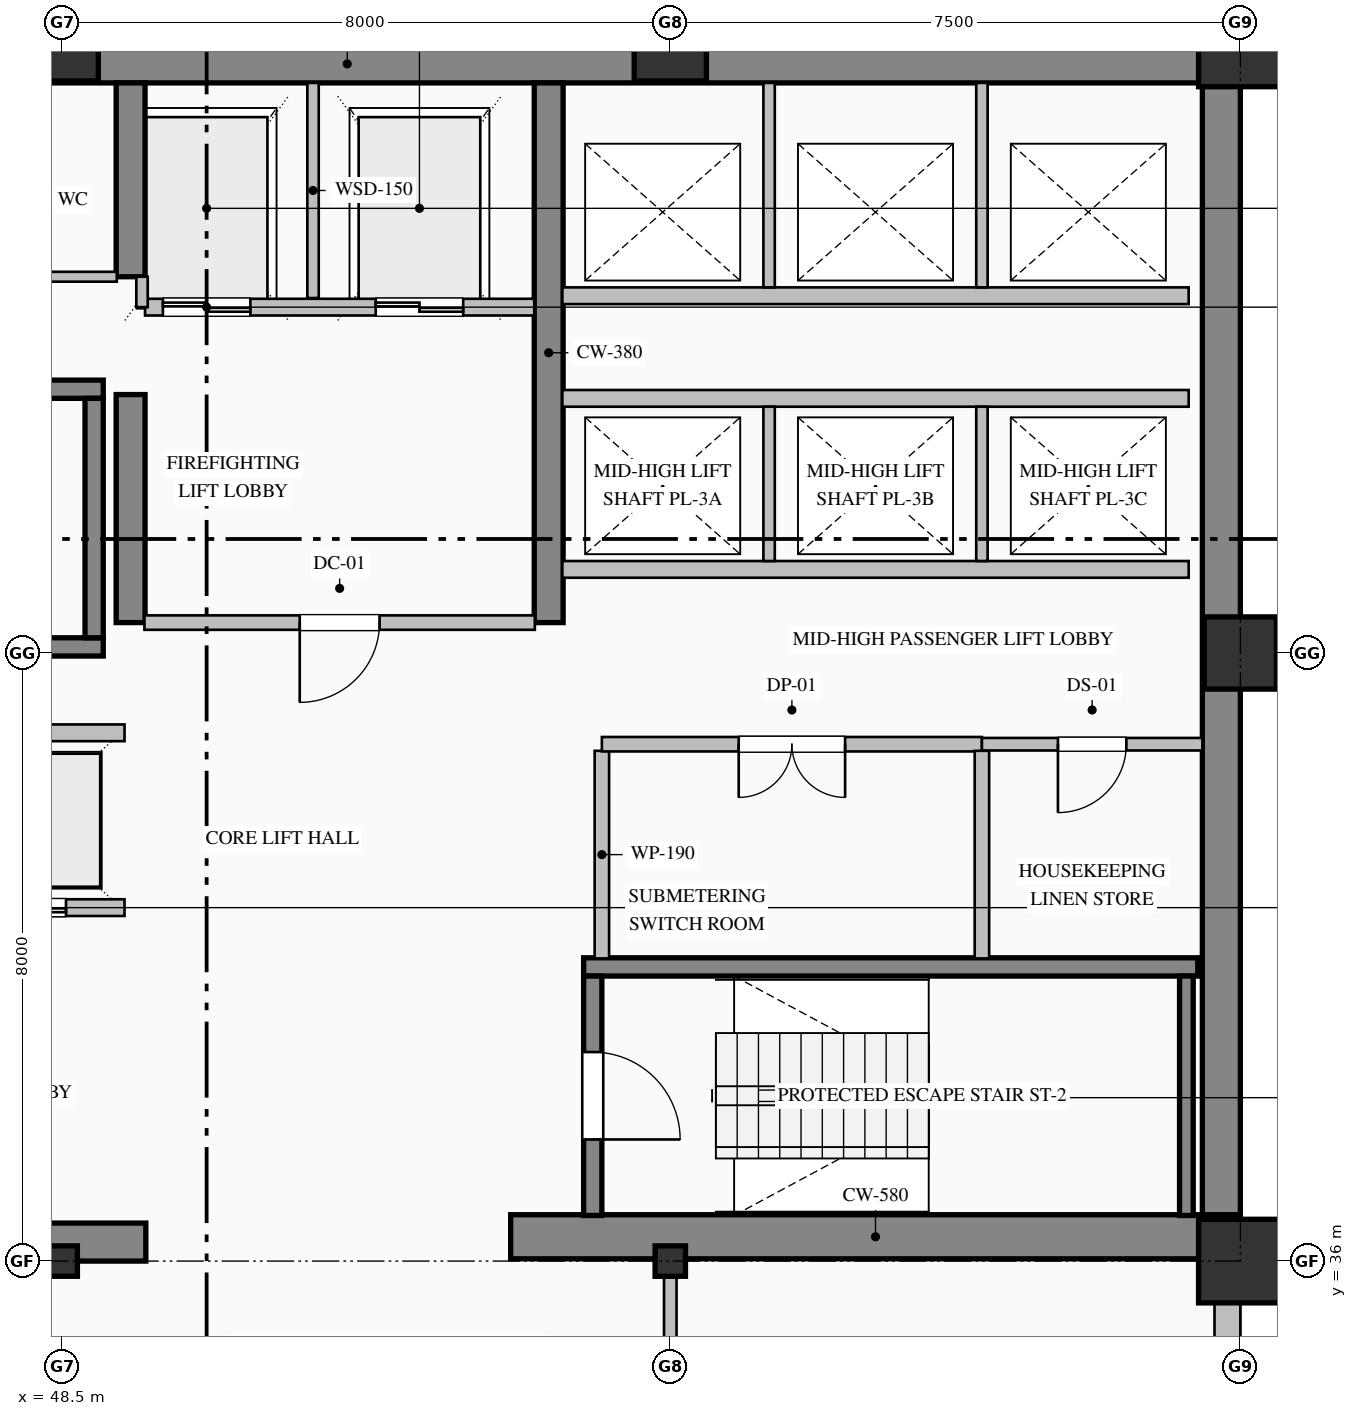
"""IFC4 building model, lengths in metres.
Left out: names, types, materials, properties, quantities, classifications, styles, units other than length and angle.
Written with IfcOpenShell. Run it as: python <this file> out.ifc"""

import sys

from ifc_helpers import new_model, si_unit, direction, frame, frame_2d, origin, origin_2d, place, context, subcontext, project, spatial, rectangle, hollow_rectangle, i_section, extrude, element, fill, save


model = new_model("IFC4")
c1 = context("Model", 3, precision=1e-05, world=origin(), true_north=direction((0.0, 1.0)))
c2 = subcontext(c1, "Body", "Model", "MODEL_VIEW")
j1 = project(units=[si_unit("LENGTHUNIT", "METRE"), si_unit("PLANEANGLEUNIT", "RADIAN")], contexts=[c1])
p1 = place(None, origin())
s1 = spatial("IfcSite", under=j1, at=p1, CompositionType="ELEMENT")
p2 = place(p1, origin())
s2 = spatial("IfcBuilding", under=s1, at=p2, CompositionType="ELEMENT")
p3 = place(p2, frame((0.0, 0.0, 131.0)))
s3 = spatial("IfcBuildingStorey", under=s2, at=p3, CompositionType="ELEMENT", Elevation=131.0)
p4 = place(p3, frame((40.5, 51.75, 0.0), z_axis=(0.0, 0.0, 1.0), x_axis=(1.0, 0.0, 0.0)))
e1 = element("IfcWall", 1, at=p4, inside=s3, PredefinedType="SHEAR", context=c2, shape_type="SweptSolid", body=[
    extrude(rectangle(XDim=23.5, YDim=0.5, at=frame_2d((11.75, 0.0))), origin(), (0.0, 0.0, 1.0), 3.765),
])
p5 = place(p3, frame((63.75, 36.32, 0.0), z_axis=(0.0, 0.0, 1.0), x_axis=(0.0, 1.0, 0.0)))
e2 = element("IfcWall", 2, at=p5, inside=s3, PredefinedType="SHEAR", context=c2, shape_type="SweptSolid", body=[
    extrude(rectangle(XDim=15.18, YDim=0.5, at=frame_2d((7.59, 0.0))), origin(), (0.0, 0.0, 1.0), 3.765),
])
p6 = place(p3, frame((40.5, 36.25, 0.0), z_axis=(0.0, 0.0, 1.0), x_axis=(1.0, 0.0, 0.0)))
e3 = element("IfcWall", 3, at=p6, inside=s3, PredefinedType="SHEAR", context=c2, shape_type="SweptSolid", body=[
    extrude(rectangle(XDim=9.1, YDim=0.5, at=frame_2d((4.55, 0.0))), origin(), (0.0, 0.0, 1.0), 3.765),
])
p7 = place(p3, frame((54.4, 36.32, 0.0), z_axis=(0.0, 0.0, 1.0), x_axis=(1.0, 0.0, 0.0)))
e4 = element("IfcWall", 4, at=p7, inside=s3, PredefinedType="SHEAR", context=c2, shape_type="SweptSolid", body=[
    extrude(rectangle(XDim=9.6, YDim=0.58, at=frame_2d((4.8, 0.0))), origin(), (0.0, 0.0, 1.0), 4.0),
])
p8 = place(p3, frame((49.4, 44.4, 0.0), z_axis=(0.0, 0.0, 1.0), x_axis=(0.0, 1.0, 0.0)))
e5 = element("IfcWall", 5, at=p8, inside=s3, PredefinedType="SHEAR", context=c2, shape_type="SweptSolid", body=[
    extrude(rectangle(XDim=3.0, YDim=0.38, at=frame_2d((1.5, 0.0))), origin(), (0.0, 0.0, 1.0), 3.765),
])
p9 = place(p3, frame((49.4, 48.95, 0.0), z_axis=(0.0, 0.0, 1.0), x_axis=(0.0, 1.0, 0.0)))
e6 = element("IfcWall", 6, at=p9, inside=s3, PredefinedType="SHEAR", context=c2, shape_type="SweptSolid", body=[
    extrude(rectangle(XDim=2.55, YDim=0.38, at=frame_2d((1.275, 0.0))), origin(), (0.0, 0.0, 1.0), 3.765),
])
p10 = place(p3, frame((54.9, 44.4, 0.0), z_axis=(0.0, 0.0, 1.0), x_axis=(0.0, 1.0, 0.0)))
e7 = element("IfcWall", 7, at=p10, inside=s3, PredefinedType="SHEAR", context=c2, shape_type="SweptSolid", body=[
    extrude(rectangle(XDim=7.1, YDim=0.38, at=frame_2d((3.55, 0.0))), origin(), (0.0, 0.0, 1.0), 3.765),
])
p11 = place(p3, frame((48.5, 36.0, 0.0), z_axis=(0.0, 0.0, 1.0), x_axis=(1.0, 0.0, 0.0)))
e8 = element("IfcColumn", 8, at=p11, inside=s3, PredefinedType="COLUMN", context=c2, shape_type="SweptSolid", body=[
    extrude(i_section(OverallWidth=0.4, OverallDepth=0.4, WebThickness=0.013, FlangeThickness=0.021, FilletRadius=0.022, at=origin_2d()), origin(), (0.0, 0.0, 1.0), 4.0),
])
p12 = place(p3, frame((48.5, 52.0, 0.0), z_axis=(0.0, 0.0, 1.0), x_axis=(1.0, 0.0, 0.0)))
e9 = element("IfcColumn", 9, at=p12, inside=s3, PredefinedType="COLUMN", context=c2, shape_type="SweptSolid", body=[
    extrude(hollow_rectangle(XDim=0.95, YDim=0.95, WallThickness=0.036, at=origin_2d()), origin(), (0.0, 0.0, 1.0), 4.0),
])
p13 = place(p3, frame((56.5, 36.0, 0.0), z_axis=(0.0, 0.0, 1.0), x_axis=(1.0, 0.0, 0.0)))
e10 = element("IfcColumn", 10, at=p13, inside=s3, PredefinedType="COLUMN", context=c2, shape_type="SweptSolid", body=[
    extrude(i_section(OverallWidth=0.4, OverallDepth=0.4, WebThickness=0.013, FlangeThickness=0.021, FilletRadius=0.022, at=origin_2d()), origin(), (0.0, 0.0, 1.0), 4.0),
])
p14 = place(p3, frame((56.5, 52.0, 0.0), z_axis=(0.0, 0.0, 1.0), x_axis=(1.0, 0.0, 0.0)))
e11 = element("IfcColumn", 11, at=p14, inside=s3, PredefinedType="COLUMN", context=c2, shape_type="SweptSolid", body=[
    extrude(hollow_rectangle(XDim=0.95, YDim=0.95, WallThickness=0.036, at=origin_2d()), origin(), (0.0, 0.0, 1.0), 4.0),
])
p15 = place(p3, frame((64.0, 36.0, 0.0), z_axis=(0.0, 0.0, 1.0), x_axis=(1.0, 0.0, 0.0)))
e12 = element("IfcColumn", 12, at=p15, inside=s3, PredefinedType="COLUMN", context=c2, shape_type="SweptSolid", body=[
    extrude(hollow_rectangle(XDim=1.1, YDim=1.1, WallThickness=0.04, at=origin_2d()), origin(), (0.0, 0.0, 1.0), 4.0),
])
p16 = place(p3, frame((64.0, 44.0, 0.0), z_axis=(0.0, 0.0, 1.0), x_axis=(1.0, 0.0, 0.0)))
e13 = element("IfcColumn", 13, at=p16, inside=s3, PredefinedType="COLUMN", context=c2, shape_type="SweptSolid", body=[
    extrude(hollow_rectangle(XDim=0.95, YDim=0.95, WallThickness=0.036, at=origin_2d()), origin(), (0.0, 0.0, 1.0), 4.0),
])
p17 = place(p3, frame((64.0, 52.0, 0.0), z_axis=(0.0, 0.0, 1.0), x_axis=(1.0, 0.0, 0.0)))
e14 = element("IfcColumn", 14, at=p17, inside=s3, PredefinedType="COLUMN", context=c2, shape_type="SweptSolid", body=[
    extrude(hollow_rectangle(XDim=1.1, YDim=1.1, WallThickness=0.04, at=origin_2d()), origin(), (0.0, 0.0, 1.0), 4.0),
])
p18 = place(p3, frame((63.83, 36.05, 0.0), z_axis=(0.0, 0.0, 1.0), x_axis=(0.0, -1.0, 0.0)))
e15 = element("IfcWall", 15, at=p18, inside=s3, PredefinedType="SOLIDWALL", context=c2, shape_type="SweptSolid", body=[
    extrude(rectangle(XDim=28.05, YDim=0.34, at=frame_2d((14.025, 0.0))), origin(), (0.0, 0.0, 1.0), 3.265),
])
p19 = place(p18, frame((2.775, 0.0, 0.85)))
e16 = element("IfcOpeningElement", 16, at=p19, cuts=e15, PredefinedType="OPENING", context=c2, shape_type="SweptSolid", body=[
    extrude(rectangle(XDim=1.65, YDim=1.95, at=frame_2d((0.825, 0.975))), frame((0.0, 0.18, 0.0), z_axis=(0.0, -1.0, 0.0), x_axis=(1.0, 0.0, 0.0)), (0.0, 0.0, 1.0), 0.36),
])
p20 = place(p18, frame((10.05, 0.0, 0.85)))
e17 = element("IfcOpeningElement", 17, at=p20, cuts=e15, PredefinedType="OPENING", context=c2, shape_type="SweptSolid", body=[
    extrude(rectangle(XDim=1.5, YDim=1.95, at=frame_2d((0.75, 0.975))), frame((0.0, 0.18, 0.0), z_axis=(0.0, -1.0, 0.0), x_axis=(1.0, 0.0, 0.0)), (0.0, 0.0, 1.0), 0.36),
])
p21 = place(p18, frame((13.575, 0.0, 0.85)))
e18 = element("IfcOpeningElement", 18, at=p21, cuts=e15, PredefinedType="OPENING", context=c2, shape_type="SweptSolid", body=[
    extrude(rectangle(XDim=1.65, YDim=1.95, at=frame_2d((0.825, 0.975))), frame((0.0, 0.18, 0.0), z_axis=(0.0, -1.0, 0.0), x_axis=(1.0, 0.0, 0.0)), (0.0, 0.0, 1.0), 0.36),
])
for number, where, z_axis, x_axis in (
    (19, (40.96, 47.47, 0.0), (0.0, 0.0, 1.0), (1.0, 0.0, 0.0)),
    (20, (49.04, 44.08, 0.0), (0.0, 0.0, 1.0), (-1.0, 0.0, 0.0)),
):
    element("IfcWall", number, at=place(p3, frame(where, z_axis=z_axis, x_axis=x_axis)), inside=s3, PredefinedType="SOLIDWALL", context=c2, shape_type="SweptSolid", body=[
        extrude(rectangle(XDim=8.08, YDim=0.24, at=frame_2d((4.04, 0.0))), origin(), (0.0, 0.0, 1.0), 4.0),
    ])
p22 = place(p3, frame((48.92, 44.2, 0.0), z_axis=(0.0, 0.0, 1.0), x_axis=(0.0, 1.0, 0.0)))
e21 = element("IfcWall", 21, at=p22, inside=s3, PredefinedType="SOLIDWALL", context=c2, shape_type="SweptSolid", body=[
    extrude(rectangle(XDim=3.15, YDim=0.24, at=frame_2d((1.575, 0.0))), origin(), (0.0, 0.0, 1.0), 4.0),
])
p23 = place(p3, frame((55.36, 39.87, 0.0), z_axis=(0.0, 0.0, 1.0), x_axis=(1.0, 0.0, 0.0)))
e22 = element("IfcWall", 22, at=p23, inside=s3, PredefinedType="SOLIDWALL", context=c2, shape_type="SweptSolid", body=[
    extrude(rectangle(XDim=8.08, YDim=0.24, at=frame_2d((4.04, 0.0))), origin(), (0.0, 0.0, 1.0), 4.0),
])
p24 = place(p3, frame((55.48, 39.75, 0.0), z_axis=(0.0, 0.0, 1.0), x_axis=(0.0, -1.0, 0.0)))
e23 = element("IfcWall", 23, at=p24, inside=s3, PredefinedType="SOLIDWALL", context=c2, shape_type="SweptSolid", body=[
    extrude(rectangle(XDim=3.15, YDim=0.24, at=frame_2d((1.575, 0.0))), origin(), (0.0, 0.0, 1.0), 4.0),
])
p25 = place(p24, frame((1.0, 0.0, 0.0)))
e24 = element("IfcOpeningElement", 24, at=p25, cuts=e23, PredefinedType="OPENING", context=c2, shape_type="SweptSolid", body=[
    extrude(rectangle(XDim=1.15, YDim=2.2, at=frame_2d((0.575, 1.1))), frame((0.0, 0.13, 0.0), z_axis=(0.0, -1.0, 0.0), x_axis=(1.0, 0.0, 0.0)), (0.0, 0.0, 1.0), 0.26),
])
p26 = place(p3, frame((63.29, 36.6, 0.0), z_axis=(0.0, 0.0, 1.0), x_axis=(0.0, 1.0, 0.0)))
e25 = element("IfcWall", 25, at=p26, inside=s3, PredefinedType="SOLIDWALL", context=c2, shape_type="SweptSolid", body=[
    extrude(rectangle(XDim=3.15, YDim=0.18, at=frame_2d((1.575, 0.0))), origin(), (0.0, 0.0, 1.0), 4.0),
])
p27 = place(p3, frame((54.71, 48.55, 0.0), z_axis=(0.0, 0.0, 1.0), x_axis=(-1.0, 0.0, 0.0)))
e26 = element("IfcWall", 26, at=p27, inside=s3, PredefinedType="PARTITIONING", context=c2, shape_type="SweptSolid", body=[
    extrude(rectangle(XDim=5.12, YDim=0.22, at=frame_2d((2.56, 0.0))), origin(), (0.0, 0.0, 1.0), 3.765),
])
p28 = place(p27, frame((3.735, 0.0, 0.0)))
e27 = element("IfcOpeningElement", 27, at=p28, cuts=e26, PredefinedType="OPENING", context=c2, shape_type="SweptSolid", body=[
    extrude(rectangle(XDim=1.15, YDim=2.2, at=frame_2d((0.575, 1.1))), frame((0.0, 0.12, 0.0), z_axis=(0.0, -1.0, 0.0), x_axis=(1.0, 0.0, 0.0)), (0.0, 0.0, 1.0), 0.24),
])
p29 = place(p27, frame((0.935, 0.0, 0.0)))
e28 = element("IfcOpeningElement", 28, at=p29, cuts=e26, PredefinedType="OPENING", context=c2, shape_type="SweptSolid", body=[
    extrude(rectangle(XDim=1.15, YDim=2.2, at=frame_2d((0.575, 1.1))), frame((0.0, 0.12, 0.0), z_axis=(0.0, -1.0, 0.0), x_axis=(1.0, 0.0, 0.0)), (0.0, 0.0, 1.0), 0.24),
])
p30 = place(p3, frame((51.8, 48.67, 0.0), z_axis=(0.0, 0.0, 1.0), x_axis=(0.0, 1.0, 0.0)))
e29 = element("IfcWall", 29, at=p30, inside=s3, PredefinedType="PARTITIONING", context=c2, shape_type="SweptSolid", body=[
    extrude(rectangle(XDim=2.83, YDim=0.15, at=frame_2d((1.415, 0.0))), origin(), (0.0, 0.0, 1.0), 3.765),
])
p31 = place(p3, frame((49.55, 48.55, 0.0), z_axis=(0.0, 0.0, 1.0), x_axis=(0.0, 1.0, 0.0)))
e30 = element("IfcWall", 30, at=p31, inside=s3, PredefinedType="PARTITIONING", context=c2, shape_type="SweptSolid", body=[
    extrude(rectangle(XDim=0.4, YDim=0.15, at=frame_2d((0.2, 0.0))), origin(), (0.0, 0.0, 1.0), 3.765),
])
p32 = place(p3, frame((49.32, 40.65, 0.0), z_axis=(0.0, 0.0, 1.0), x_axis=(-1.0, 0.0, 0.0)))
e31 = element("IfcWall", 31, at=p32, inside=s3, PredefinedType="PARTITIONING", context=c2, shape_type="SweptSolid", body=[
    extrude(rectangle(XDim=8.24, YDim=0.22, at=frame_2d((4.12, 0.0))), origin(), (0.0, 0.0, 1.0), 3.765),
])
p33 = place(p32, frame((6.37, 0.0, 0.0)))
e32 = element("IfcOpeningElement", 32, at=p33, cuts=e31, PredefinedType="OPENING", context=c2, shape_type="SweptSolid", body=[
    extrude(rectangle(XDim=1.1, YDim=2.2, at=frame_2d((0.55, 1.1))), frame((0.0, 0.12, 0.0), z_axis=(0.0, -1.0, 0.0), x_axis=(1.0, 0.0, 0.0)), (0.0, 0.0, 1.0), 0.24),
])
p34 = place(p32, frame((3.57, 0.0, 0.0)))
e33 = element("IfcOpeningElement", 33, at=p34, cuts=e31, PredefinedType="OPENING", context=c2, shape_type="SweptSolid", body=[
    extrude(rectangle(XDim=1.1, YDim=2.2, at=frame_2d((0.55, 1.1))), frame((0.0, 0.12, 0.0), z_axis=(0.0, -1.0, 0.0), x_axis=(1.0, 0.0, 0.0)), (0.0, 0.0, 1.0), 0.24),
])
p35 = place(p32, frame((0.77, 0.0, 0.0)))
e34 = element("IfcOpeningElement", 34, at=p35, cuts=e31, PredefinedType="OPENING", context=c2, shape_type="SweptSolid", body=[
    extrude(rectangle(XDim=1.1, YDim=2.2, at=frame_2d((0.55, 1.1))), frame((0.0, 0.12, 0.0), z_axis=(0.0, -1.0, 0.0), x_axis=(1.0, 0.0, 0.0)), (0.0, 0.0, 1.0), 0.24),
])
for number, where, z_axis, x_axis in (
    (35, (41.08, 42.95, 0.0), (0.0, 0.0, 1.0), (1.0, 0.0, 0.0)),
    (36, (63.32, 45.1, 0.0), (0.0, 0.0, 1.0), (-1.0, 0.0, 0.0)),
    (37, (55.08, 47.35, 0.0), (0.0, 0.0, 1.0), (1.0, 0.0, 0.0)),
):
    element("IfcWall", number, at=place(p3, frame(where, z_axis=z_axis, x_axis=x_axis)), inside=s3, PredefinedType="PARTITIONING", context=c2, shape_type="SweptSolid", body=[
        extrude(rectangle(XDim=8.24, YDim=0.22, at=frame_2d((4.12, 0.0))), origin(), (0.0, 0.0, 1.0), 3.765),
    ])
for number, where, z_axis, x_axis in (
    (38, (57.8, 45.21, 0.0), (0.0, 0.0, 1.0), (0.0, 1.0, 0.0)),
    (39, (60.6, 45.21, 0.0), (0.0, 0.0, 1.0), (0.0, 1.0, 0.0)),
):
    element("IfcWall", number, at=place(p3, frame(where, z_axis=z_axis, x_axis=x_axis)), inside=s3, PredefinedType="PARTITIONING", context=c2, shape_type="SweptSolid", body=[
        extrude(rectangle(XDim=2.03, YDim=0.15, at=frame_2d((1.015, 0.0))), origin(), (0.0, 0.0, 1.0), 3.765),
    ])
p36 = place(p3, frame((63.32, 48.7, 0.0), z_axis=(0.0, 0.0, 1.0), x_axis=(-1.0, 0.0, 0.0)))
e40 = element("IfcWall", 40, at=p36, inside=s3, PredefinedType="PARTITIONING", context=c2, shape_type="SweptSolid", body=[
    extrude(rectangle(XDim=8.24, YDim=0.22, at=frame_2d((4.12, 0.0))), origin(), (0.0, 0.0, 1.0), 3.765),
])
for number, where, z_axis, x_axis in (
    (41, (57.8, 48.81, 0.0), (0.0, 0.0, 1.0), (0.0, 1.0, 0.0)),
    (42, (60.6, 48.81, 0.0), (0.0, 0.0, 1.0), (0.0, 1.0, 0.0)),
):
    element("IfcWall", number, at=place(p3, frame(where, z_axis=z_axis, x_axis=x_axis)), inside=s3, PredefinedType="PARTITIONING", context=c2, shape_type="SweptSolid", body=[
        extrude(rectangle(XDim=2.69, YDim=0.15, at=frame_2d((1.345, 0.0))), origin(), (0.0, 0.0, 1.0), 3.765),
    ])
p37 = place(p3, frame((43.5, 48.95, 0.0), z_axis=(0.0, 0.0, 1.0), x_axis=(1.0, 0.0, 0.0)))
e43 = element("IfcWall", 43, at=p37, inside=s3, PredefinedType="PARTITIONING", context=c2, shape_type="SweptSolid", body=[
    extrude(rectangle(XDim=5.718, YDim=0.13, at=frame_2d((2.859, 0.0))), origin(), (0.0, 0.0, 1.0), 3.765),
])
p38 = place(p37, frame((2.399, 0.0, 0.0)))
e44 = element("IfcOpeningElement", 44, at=p38, cuts=e43, PredefinedType="OPENING", context=c2, shape_type="SweptSolid", body=[
    extrude(rectangle(XDim=0.92, YDim=2.15, at=frame_2d((0.46, 1.075))), frame((0.0, 0.075, 0.0), z_axis=(0.0, -1.0, 0.0), x_axis=(1.0, 0.0, 0.0)), (0.0, 0.0, 1.0), 0.15),
])
p39 = place(p3, frame((54.718, 44.4, 0.0), z_axis=(0.0, 0.0, 1.0), x_axis=(-1.0, 0.0, 0.0)))
e45 = element("IfcWall", 45, at=p39, inside=s3, PredefinedType="PARTITIONING", context=c2, shape_type="SweptSolid", body=[
    extrude(rectangle(XDim=5.136, YDim=0.19, at=frame_2d((2.568, 0.0))), origin(), (0.0, 0.0, 1.0), 3.765),
])
p40 = place(p39, frame((2.043, 0.0, 0.0)))
e46 = element("IfcOpeningElement", 46, at=p40, cuts=e45, PredefinedType="OPENING", context=c2, shape_type="SweptSolid", body=[
    extrude(rectangle(XDim=1.05, YDim=2.15, at=frame_2d((0.525, 1.075))), frame((0.0, 0.105, 0.0), z_axis=(0.0, -1.0, 0.0), x_axis=(1.0, 0.0, 0.0)), (0.0, 0.0, 1.0), 0.21),
])
p41 = place(p3, frame((55.6, 42.713, 0.0), z_axis=(0.0, 0.0, 1.0), x_axis=(0.0, -1.0, 0.0)))
e47 = element("IfcWall", 47, at=p41, inside=s3, PredefinedType="PARTITIONING", context=c2, shape_type="SweptSolid", body=[
    extrude(rectangle(XDim=2.731, YDim=0.19, at=frame_2d((1.365, 0.0))), origin(), (0.0, 0.0, 1.0), 3.765),
])
p42 = place(p3, frame((60.6, 42.8, 0.0), z_axis=(0.0, 0.0, 1.0), x_axis=(-1.0, 0.0, 0.0)))
e48 = element("IfcWall", 48, at=p42, inside=s3, PredefinedType="PARTITIONING", context=c2, shape_type="SweptSolid", body=[
    extrude(rectangle(XDim=5.0, YDim=0.19, at=frame_2d((2.5, 0.0))), origin(), (0.0, 0.0, 1.0), 3.765),
])
p43 = place(p42, frame((1.8, 0.0, 0.0)))
e49 = element("IfcOpeningElement", 49, at=p43, cuts=e48, PredefinedType="OPENING", context=c2, shape_type="SweptSolid", body=[
    extrude(rectangle(XDim=1.4, YDim=2.25, at=frame_2d((0.7, 1.125))), frame((0.0, 0.105, 0.0), z_axis=(0.0, -1.0, 0.0), x_axis=(1.0, 0.0, 0.0)), (0.0, 0.0, 1.0), 0.21),
])
p44 = place(p3, frame((63.5, 42.8, 0.0), z_axis=(0.0, 0.0, 1.0), x_axis=(-1.0, 0.0, 0.0)))
e50 = element("IfcWall", 50, at=p44, inside=s3, PredefinedType="PARTITIONING", context=c2, shape_type="SweptSolid", body=[
    extrude(rectangle(XDim=2.9, YDim=0.165, at=frame_2d((1.45, 0.0))), origin(), (0.0, 0.0, 1.0), 3.765),
])
p45 = place(p44, frame((1.0, 0.0, 0.0)))
e51 = element("IfcOpeningElement", 51, at=p45, cuts=e50, PredefinedType="OPENING", context=c2, shape_type="SweptSolid", body=[
    extrude(rectangle(XDim=0.9, YDim=2.15, at=frame_2d((0.45, 1.075))), frame((0.0, 0.093, 0.0), z_axis=(0.0, -1.0, 0.0), x_axis=(1.0, 0.0, 0.0)), (0.0, 0.0, 1.0), 0.185),
])
p46 = place(p3, frame((60.6, 42.713, 0.0), z_axis=(0.0, 0.0, 1.0), x_axis=(0.0, -1.0, 0.0)))
e52 = element("IfcWall", 52, at=p46, inside=s3, PredefinedType="PARTITIONING", context=c2, shape_type="SweptSolid", body=[
    extrude(rectangle(XDim=2.731, YDim=0.19, at=frame_2d((1.365, 0.0))), origin(), (0.0, 0.0, 1.0), 3.765),
])
p47 = place(p3, frame((56.5, 36.0, 0.0), z_axis=(0.0, 0.0, 1.0), x_axis=(0.0, -1.0, 0.0)))
e53 = element("IfcWall", 53, at=p47, inside=s3, PredefinedType="PARTITIONING", context=c2, shape_type="SweptSolid", body=[
    extrude(rectangle(XDim=2.325, YDim=0.165, at=frame_2d((1.163, 0.0))), origin(), (0.0, 0.0, 1.0), 3.157),
])
p48 = place(p25, origin())
e54 = element("IfcDoor", 54, at=p48, inside=s3, OperationType="SINGLE_SWING_RIGHT", PredefinedType="DOOR", context=c2, shape_type="SweptSolid", body=[
    extrude(rectangle(XDim=1.15, YDim=2.2, at=frame_2d((0.575, 1.1))), frame((0.0, 0.025, 0.0), z_axis=(0.0, -1.0, 0.0), x_axis=(1.0, 0.0, 0.0)), (0.0, 0.0, 1.0), 0.05),
])
fill(e24, e54)
p49 = place(p28, origin())
e55 = element("IfcDoor", 55, at=p49, inside=s3, OperationType="DOUBLE_DOOR_SLIDING", PredefinedType="DOOR", context=c2, shape_type="SweptSolid", body=[
    extrude(rectangle(XDim=1.15, YDim=2.2, at=frame_2d((0.575, 1.1))), frame((0.0, 0.025, 0.0), z_axis=(0.0, -1.0, 0.0), x_axis=(1.0, 0.0, 0.0)), (0.0, 0.0, 1.0), 0.05),
])
fill(e27, e55)
p50 = place(p29, origin())
e56 = element("IfcDoor", 56, at=p50, inside=s3, OperationType="DOUBLE_DOOR_SLIDING", PredefinedType="DOOR", context=c2, shape_type="SweptSolid", body=[
    extrude(rectangle(XDim=1.15, YDim=2.2, at=frame_2d((0.575, 1.1))), frame((0.0, 0.025, 0.0), z_axis=(0.0, -1.0, 0.0), x_axis=(1.0, 0.0, 0.0)), (0.0, 0.0, 1.0), 0.05),
])
fill(e28, e56)
p51 = place(p35, origin())
e57 = element("IfcDoor", 57, at=p51, inside=s3, OperationType="DOUBLE_DOOR_SLIDING", PredefinedType="DOOR", context=c2, shape_type="SweptSolid", body=[
    extrude(rectangle(XDim=1.1, YDim=2.2, at=frame_2d((0.55, 1.1))), frame((0.0, 0.025, 0.0), z_axis=(0.0, -1.0, 0.0), x_axis=(1.0, 0.0, 0.0)), (0.0, 0.0, 1.0), 0.05),
])
fill(e34, e57)
p52 = place(p40, origin())
e58 = element("IfcDoor", 58, at=p52, inside=s3, OperationType="SINGLE_SWING_RIGHT", PredefinedType="DOOR", context=c2, shape_type="SweptSolid", body=[
    extrude(rectangle(XDim=1.05, YDim=2.15, at=frame_2d((0.525, 1.075))), frame((0.0, 0.025, 0.0), z_axis=(0.0, -1.0, 0.0), x_axis=(1.0, 0.0, 0.0)), (0.0, 0.0, 1.0), 0.05),
])
fill(e46, e58)
p53 = place(p43, origin())
e59 = element("IfcDoor", 59, at=p53, inside=s3, OperationType="DOUBLE_DOOR_SINGLE_SWING", PredefinedType="DOOR", context=c2, shape_type="SweptSolid", body=[
    extrude(rectangle(XDim=1.4, YDim=2.25, at=frame_2d((0.7, 1.125))), frame((0.0, 0.025, 0.0), z_axis=(0.0, -1.0, 0.0), x_axis=(1.0, 0.0, 0.0)), (0.0, 0.0, 1.0), 0.05),
])
fill(e49, e59)
p54 = place(p45, origin())
e60 = element("IfcDoor", 60, at=p54, inside=s3, OperationType="SINGLE_SWING_RIGHT", PredefinedType="DOOR", context=c2, shape_type="SweptSolid", body=[
    extrude(rectangle(XDim=0.9, YDim=2.15, at=frame_2d((0.45, 1.075))), frame((0.0, 0.025, 0.0), z_axis=(0.0, -1.0, 0.0), x_axis=(1.0, 0.0, 0.0)), (0.0, 0.0, 1.0), 0.05),
])
fill(e51, e60)
save(model, sys.argv[1])
